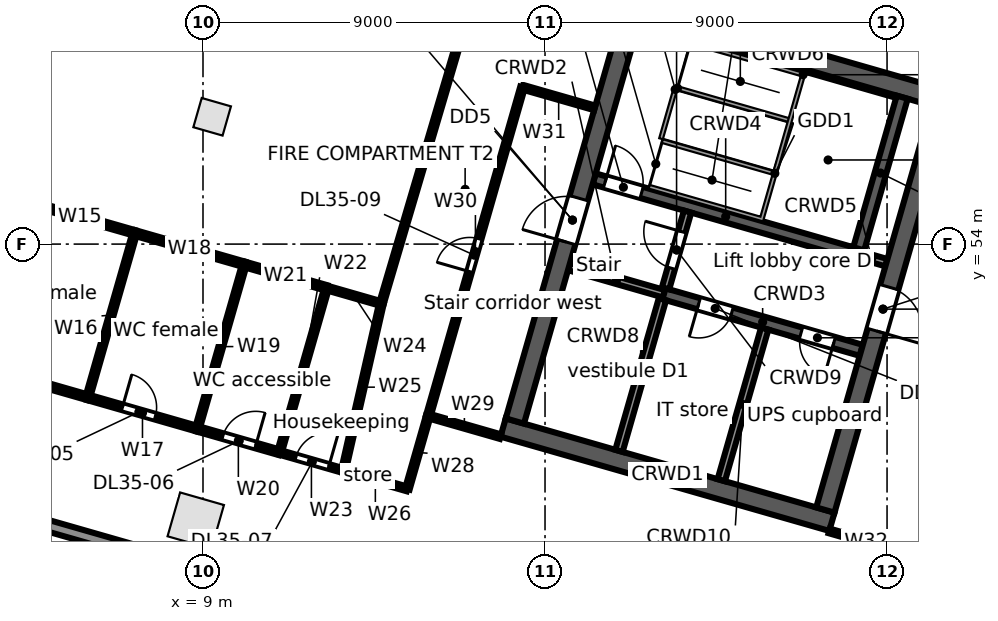
"""IFC4 building model, lengths in metres.
Left out: names, types, materials, properties, quantities, classifications, styles, units other than length and angle.
Written with IfcOpenShell. Run it as: python <this file> out.ifc"""

import sys

from ifc_helpers import new_model, si_unit, direction, frame, frame_2d, origin, origin_2d, place, context, subcontext, project, spatial, rectangle, extrude, element, fill, save


model = new_model("IFC4")
c1 = context("Model", 3, precision=1e-05, world=origin(), true_north=direction((0.0, 1.0)))
c2 = subcontext(c1, "Body", "Model", "MODEL_VIEW")
j1 = project(units=[si_unit("LENGTHUNIT", "METRE"), si_unit("PLANEANGLEUNIT", "RADIAN")], contexts=[c1])
p1 = place(None, origin())
s1 = spatial("IfcSite", under=j1, at=p1, CompositionType="ELEMENT")
p2 = place(p1, origin())
s2 = spatial("IfcBuilding", under=s1, at=p2, CompositionType="ELEMENT")
p3 = place(p2, frame((0.0, 0.0, 174.9)))
s3 = spatial("IfcBuildingStorey", under=s2, at=p3, CompositionType="ELEMENT", Elevation=174.9)
p4 = place(p3, frame((8.81, 46.722, 0.0), z_axis=(0.0, 0.0, 1.0), x_axis=(0.961261695938, -0.275637355817, 0.0)))
e1 = element("IfcColumn", 1, at=p4, inside=s3, PredefinedType="COLUMN", context=c2, shape_type="SweptSolid", body=[
    extrude(rectangle(XDim=1.2, YDim=1.2, at=origin_2d()), origin(), (0.0, 0.0, 1.0), 4.0),
])
p5 = place(p3, frame((9.241, 57.35, 0.0), z_axis=(0.0, 0.0, 1.0), x_axis=(0.961261695938, -0.275637355817, 0.0)))
e2 = element("IfcColumn", 2, at=p5, inside=s3, PredefinedType="COLUMN", context=c2, shape_type="SweptSolid", body=[
    extrude(rectangle(XDim=0.8, YDim=0.8, at=origin_2d()), origin(), (0.0, 0.0, 1.0), 4.0),
])
p6 = place(p3, frame((24.042, 41.106, 0.0), z_axis=(0.0, 0.0, 1.0), x_axis=(-0.961261693976, 0.275637362661, 0.0)))
e3 = element("IfcWall", 3, at=p6, inside=s3, PredefinedType="STANDARD", context=c2, shape_type="SweptSolid", body=[
    extrude(rectangle(XDim=24.948, YDim=0.3, at=frame_2d((12.474, 0.0))), origin(), (0.0, 0.0, 1.0), 3.68),
])
p7 = place(p6, frame((21.441, 0.0, 0.6)))
e4 = element("IfcOpeningElement", 4, at=p7, cuts=e3, PredefinedType="OPENING", context=c2, shape_type="SweptSolid", body=[
    extrude(rectangle(XDim=0.9, YDim=2.4, at=frame_2d((0.45, 1.2))), frame((0.0, 0.16, 0.0), z_axis=(0.0, -1.0, 0.0), x_axis=(1.0, 0.0, 0.0)), (0.0, 0.0, 1.0), 0.32),
])
p8 = place(p6, frame((13.121, 0.0, 0.6)))
e5 = element("IfcOpeningElement", 5, at=p8, cuts=e3, PredefinedType="OPENING", context=c2, shape_type="SweptSolid", body=[
    extrude(rectangle(XDim=0.9, YDim=2.4, at=frame_2d((0.45, 1.2))), frame((0.0, 0.16, 0.0), z_axis=(0.0, -1.0, 0.0), x_axis=(1.0, 0.0, 0.0)), (0.0, 0.0, 1.0), 0.32),
])
p9 = place(p6, frame((10.591, 0.0, 0.0)))
e6 = element("IfcOpeningElement", 6, at=p9, cuts=e3, PredefinedType="OPENING", context=c2, shape_type="SweptSolid", body=[
    extrude(rectangle(XDim=1.8, YDim=2.4, at=frame_2d((0.9, 1.2))), frame((0.0, 0.16, 0.0), z_axis=(0.0, -1.0, 0.0), x_axis=(1.0, 0.0, 0.0)), (0.0, 0.0, 1.0), 0.32),
])
p10 = place(p6, frame((4.8, 0.0, 0.6)))
e7 = element("IfcOpeningElement", 7, at=p10, cuts=e3, PredefinedType="OPENING", context=c2, shape_type="SweptSolid", body=[
    extrude(rectangle(XDim=0.9, YDim=2.4, at=frame_2d((0.45, 1.2))), frame((0.0, 0.16, 0.0), z_axis=(0.0, -1.0, 0.0), x_axis=(1.0, 0.0, 0.0)), (0.0, 0.0, 1.0), 0.32),
])
p11 = place(p6, frame((2.27, 0.0, 0.0)))
e8 = element("IfcOpeningElement", 8, at=p11, cuts=e3, PredefinedType="OPENING", context=c2, shape_type="SweptSolid", body=[
    extrude(rectangle(XDim=1.8, YDim=2.4, at=frame_2d((0.9, 1.2))), frame((0.0, 0.16, 0.0), z_axis=(0.0, -1.0, 0.0), x_axis=(1.0, 0.0, 0.0)), (0.0, 0.0, 1.0), 0.32),
])
p12 = place(p3, frame((37.399, 59.851, 0.0), z_axis=(0.0, 0.0, 1.0), x_axis=(-0.529919986982, -0.848047644532, 0.0)))
e9 = element("IfcWall", 9, at=p12, inside=s3, PredefinedType="STANDARD", context=c2, shape_type="SweptSolid", body=[
    extrude(rectangle(XDim=21.125, YDim=0.3, at=frame_2d((10.562, 0.0))), origin(), (0.0, 0.0, 1.0), 3.68),
])
p13 = place(p12, frame((16.687, 0.0, 0.6)))
e10 = element("IfcOpeningElement", 10, at=p13, cuts=e9, PredefinedType="OPENING", context=c2, shape_type="SweptSolid", body=[
    extrude(rectangle(XDim=0.9, YDim=2.4, at=frame_2d((0.45, 1.2))), frame((0.0, 0.16, 0.0), z_axis=(0.0, -1.0, 0.0), x_axis=(1.0, 0.0, 0.0)), (0.0, 0.0, 1.0), 0.32),
])
p14 = place(p12, frame((6.187, 0.0, 0.6)))
e11 = element("IfcOpeningElement", 11, at=p14, cuts=e9, PredefinedType="OPENING", context=c2, shape_type="SweptSolid", body=[
    extrude(rectangle(XDim=0.9, YDim=2.4, at=frame_2d((0.45, 1.2))), frame((0.0, 0.16, 0.0), z_axis=(0.0, -1.0, 0.0), x_axis=(1.0, 0.0, 0.0)), (0.0, 0.0, 1.0), 0.32),
])
p15 = place(p3, frame((16.897, 49.173, 0.0), z_axis=(0.0, 0.0, 1.0), x_axis=(0.96126248289, -0.275634611374, 0.0)))
e12 = element("IfcWall", 12, at=p15, inside=s3, PredefinedType="SOLIDWALL", context=c2, shape_type="SweptSolid", body=[
    extrude(rectangle(XDim=9.0, YDim=0.5, at=frame_2d((4.5, 0.0))), origin(), (0.0, 0.0, 1.0), 3.68),
])
p16 = place(p3, frame((18.632, 53.409, 0.0), z_axis=(0.0, 0.0, 1.0), x_axis=(0.961247078216, -0.275688328772, 0.0)))
e13 = element("IfcWall", 13, at=p16, inside=s3, PredefinedType="SOLIDWALL", context=c2, shape_type="SweptSolid", body=[
    extrude(rectangle(XDim=2.6, YDim=0.2, at=frame_2d((1.3, 0.0))), origin(), (0.0, 0.0, 1.0), 3.68),
])
p17 = place(p3, frame((21.131, 52.692, 0.0), z_axis=(0.0, 0.0, 1.0), x_axis=(0.961271043721, -0.27560475414, 0.0)))
e14 = element("IfcWall", 14, at=p17, inside=s3, PredefinedType="SOLIDWALL", context=c2, shape_type="SweptSolid", body=[
    extrude(rectangle(XDim=5.4, YDim=0.3, at=frame_2d((2.7, 0.0))), origin(), (0.0, 0.0, 1.0), 3.68),
])
p18 = place(p17, frame((0.95, 0.0, 0.0)))
e15 = element("IfcOpeningElement", 15, at=p18, cuts=e14, PredefinedType="OPENING", context=c2, shape_type="SweptSolid", body=[
    extrude(rectangle(XDim=0.9, YDim=2.1, at=frame_2d((0.45, 1.05))), frame((0.0, 0.16, 0.0), z_axis=(0.0, -1.0, 0.0), x_axis=(1.0, 0.0, 0.0)), (0.0, 0.0, 1.0), 0.32),
])
p19 = place(p17, frame((3.75, 0.0, 0.0)))
e16 = element("IfcOpeningElement", 16, at=p19, cuts=e14, PredefinedType="OPENING", context=c2, shape_type="SweptSolid", body=[
    extrude(rectangle(XDim=0.9, YDim=2.1, at=frame_2d((0.45, 1.05))), frame((0.0, 0.16, 0.0), z_axis=(0.0, -1.0, 0.0), x_axis=(1.0, 0.0, 0.0)), (0.0, 0.0, 1.0), 0.32),
])
p20 = place(p3, frame((19.293, 55.716, 0.0), z_axis=(0.0, 0.0, 1.0), x_axis=(0.96125862491, -0.275648065539, 0.0)))
e17 = element("IfcWall", 17, at=p20, inside=s3, PredefinedType="SOLIDWALL", context=c2, shape_type="SweptSolid", body=[
    extrude(rectangle(XDim=7.2, YDim=0.3, at=frame_2d((3.6, 0.0))), origin(), (0.0, 0.0, 1.0), 3.68),
])
p21 = place(p20, frame((0.3, 0.0, 0.0)))
e18 = element("IfcOpeningElement", 18, at=p21, cuts=e17, PredefinedType="OPENING", context=c2, shape_type="SweptSolid", body=[
    extrude(rectangle(XDim=1.0, YDim=2.1, at=frame_2d((0.5, 1.05))), frame((0.0, 0.16, 0.0), z_axis=(0.0, -1.0, 0.0), x_axis=(1.0, 0.0, 0.0)), (0.0, 0.0, 1.0), 0.32),
])
p22 = place(p3, frame((26.214, 53.732, 0.0), z_axis=(0.0, 0.0, 1.0), x_axis=(0.961200870072, -0.275849392554, 0.0)))
e19 = element("IfcWall", 19, at=p22, inside=s3, PredefinedType="SOLIDWALL", context=c2, shape_type="SweptSolid", body=[
    extrude(rectangle(XDim=0.8, YDim=0.2, at=frame_2d((0.4, 0.0))), origin(), (0.0, 0.0, 1.0), 3.68),
])
p23 = place(p3, frame((20.067, 60.228, 0.0), z_axis=(0.0, 0.0, 1.0), x_axis=(0.96126248289, -0.275634611374, 0.0)))
e20 = element("IfcWall", 20, at=p23, inside=s3, PredefinedType="SOLIDWALL", context=c2, shape_type="SweptSolid", body=[
    extrude(rectangle(XDim=9.0, YDim=0.5, at=frame_2d((4.5, 0.0))), origin(), (0.0, 0.0, 1.0), 3.68),
])
p24 = place(p3, frame((17.206, 49.344, 0.0), z_axis=(0.0, 0.0, 1.0), x_axis=(0.275632651182, 0.961263044958, 0.0)))
e21 = element("IfcWall", 21, at=p24, inside=s3, PredefinedType="SOLIDWALL", context=c2, shape_type="SweptSolid", body=[
    extrude(rectangle(XDim=11.0, YDim=0.5, at=frame_2d((5.5, 0.0))), origin(), (0.0, 0.0, 1.0), 3.68),
])
p25 = place(p24, frame((4.9, 0.0, 0.0)))
e22 = element("IfcOpeningElement", 22, at=p25, cuts=e21, PredefinedType="OPENING", context=c2, shape_type="SweptSolid", body=[
    extrude(rectangle(XDim=1.2, YDim=2.1, at=frame_2d((0.6, 1.05))), frame((0.0, 0.26, 0.0), z_axis=(0.0, -1.0, 0.0), x_axis=(1.0, 0.0, 0.0)), (0.0, 0.0, 1.0), 0.52),
])
p26 = place(p3, frame((19.946, 48.559, 0.0), z_axis=(0.0, 0.0, 1.0), x_axis=(0.275668905258, 0.961252648721, 0.0)))
e23 = element("IfcWall", 23, at=p26, inside=s3, PredefinedType="SOLIDWALL", context=c2, shape_type="SweptSolid", body=[
    extrude(rectangle(XDim=4.15, YDim=0.2, at=frame_2d((2.075, 0.0))), origin(), (0.0, 0.0, 1.0), 3.68),
])
p27 = place(p3, frame((21.172, 52.837, 0.0), z_axis=(0.0, 0.0, 1.0), x_axis=(0.275657676022, 0.961255868981, 0.0)))
e24 = element("IfcWall", 24, at=p27, inside=s3, PredefinedType="PARTITIONING", context=c2, shape_type="SweptSolid", body=[
    extrude(rectangle(XDim=2.1, YDim=0.2, at=frame_2d((1.05, 0.0))), origin(), (0.0, 0.0, 1.0), 3.68),
])
p28 = place(p27, frame((0.55, 0.0, 0.0)))
e25 = element("IfcOpeningElement", 25, at=p28, cuts=e24, PredefinedType="OPENING", context=c2, shape_type="SweptSolid", body=[
    extrude(rectangle(XDim=1.0, YDim=2.1, at=frame_2d((0.5, 1.05))), frame((0.0, 0.11, 0.0), z_axis=(0.0, -1.0, 0.0), x_axis=(1.0, 0.0, 0.0)), (0.0, 0.0, 1.0), 0.22),
])
p29 = place(p3, frame((22.637, 47.787, 0.0), z_axis=(0.0, 0.0, 1.0), x_axis=(0.275614546295, 0.961268236171, 0.0)))
e26 = element("IfcWall", 26, at=p29, inside=s3, PredefinedType="PARTITIONING", context=c2, shape_type="SweptSolid", body=[
    extrude(rectangle(XDim=4.15, YDim=0.2, at=frame_2d((2.075, 0.0))), origin(), (0.0, 0.0, 1.0), 3.68),
])
p30 = place(p3, frame((26.256, 53.876, 0.0), z_axis=(0.0, 0.0, 1.0), x_axis=(0.275614546295, 0.961268236171, 0.0)))
e27 = element("IfcWall", 27, at=p30, inside=s3, PredefinedType="SOLIDWALL", context=c2, shape_type="SweptSolid", body=[
    extrude(rectangle(XDim=4.15, YDim=0.3, at=frame_2d((2.075, 0.0))), origin(), (0.0, 0.0, 1.0), 3.68),
])
p31 = place(p3, frame((25.377, 47.002, 0.0), z_axis=(0.0, 0.0, 1.0), x_axis=(0.275632651182, 0.961263044958, 0.0)))
e28 = element("IfcWall", 28, at=p31, inside=s3, PredefinedType="SOLIDWALL", context=c2, shape_type="SweptSolid", body=[
    extrude(rectangle(XDim=11.0, YDim=0.5, at=frame_2d((5.5, 0.0))), origin(), (0.0, 0.0, 1.0), 3.68),
])
p32 = place(p31, frame((4.9, 0.0, 0.0)))
e29 = element("IfcOpeningElement", 29, at=p32, cuts=e28, PredefinedType="OPENING", context=c2, shape_type="SweptSolid", body=[
    extrude(rectangle(XDim=1.2, YDim=2.1, at=frame_2d((0.6, 1.05))), frame((0.0, 0.26, 0.0), z_axis=(0.0, -1.0, 0.0), x_axis=(1.0, 0.0, 0.0)), (0.0, 0.0, 1.0), 0.52),
])
p33 = place(p3, frame((2.601, 50.932, 0.0), z_axis=(0.0, 0.0, 1.0), x_axis=(0.961265606965, -0.27562371608, 0.0)))
e30 = element("IfcWall", 30, at=p33, inside=s3, PredefinedType="PARTITIONING", context=c2, shape_type="SweptSolid", body=[
    extrude(rectangle(XDim=3.5, YDim=0.15, at=frame_2d((1.75, 0.0))), origin(), (0.0, 0.0, 1.0), 3.68),
])
p34 = place(p33, frame((1.2, 0.0, 0.0)))
e31 = element("IfcOpeningElement", 31, at=p34, cuts=e30, PredefinedType="OPENING", context=c2, shape_type="SweptSolid", body=[
    extrude(rectangle(XDim=0.9, YDim=2.1, at=frame_2d((0.45, 1.05))), frame((0.0, 0.085, 0.0), z_axis=(0.0, -1.0, 0.0), x_axis=(1.0, 0.0, 0.0)), (0.0, 0.0, 1.0), 0.17),
])
p35 = place(p3, frame((4.322, 55.12, 0.0), z_axis=(0.0, 0.0, 1.0), x_axis=(0.961247103494, -0.275688240636, 0.0)))
e32 = element("IfcWall", 32, at=p35, inside=s3, PredefinedType="PARTITIONING", context=c2, shape_type="SweptSolid", body=[
    extrude(rectangle(XDim=3.0, YDim=0.15, at=frame_2d((1.5, 0.0))), origin(), (0.0, 0.0, 1.0), 3.68),
])
p36 = place(p3, frame((5.966, 49.967, 0.0), z_axis=(0.0, 0.0, 1.0), x_axis=(0.275545040649, 0.96128816209, 0.0)))
e33 = element("IfcWall", 33, at=p36, inside=s3, PredefinedType="PARTITIONING", context=c2, shape_type="SweptSolid", body=[
    extrude(rectangle(XDim=4.5, YDim=0.125, at=frame_2d((2.25, 0.0))), origin(), (0.0, 0.0, 1.0), 3.68),
])
p37 = place(p3, frame((5.966, 49.967, 0.0), z_axis=(0.0, 0.0, 1.0), x_axis=(0.961222353496, -0.275774522283, 0.0)))
e34 = element("IfcWall", 34, at=p37, inside=s3, PredefinedType="PARTITIONING", context=c2, shape_type="SweptSolid", body=[
    extrude(rectangle(XDim=2.999, YDim=0.15, at=frame_2d((1.5, 0.0))), origin(), (0.0, 0.0, 1.0), 2.852),
])
p38 = place(p37, frame((0.95, 0.0, 0.0)))
e35 = element("IfcOpeningElement", 35, at=p38, cuts=e34, PredefinedType="OPENING", context=c2, shape_type="SweptSolid", body=[
    extrude(rectangle(XDim=0.9, YDim=2.1, at=frame_2d((0.45, 1.05))), frame((0.0, 0.085, 0.0), z_axis=(0.0, -1.0, 0.0), x_axis=(1.0, 0.0, 0.0)), (0.0, 0.0, 1.0), 0.17),
])
p39 = place(p3, frame((7.206, 54.293, 0.0), z_axis=(0.0, 0.0, 1.0), x_axis=(0.961268664977, -0.27561305073, 0.0)))
e36 = element("IfcWall", 36, at=p39, inside=s3, PredefinedType="PARTITIONING", context=c2, shape_type="SweptSolid", body=[
    extrude(rectangle(XDim=3.0, YDim=0.15, at=frame_2d((1.5, 0.0))), origin(), (0.0, 0.0, 1.0), 2.852),
])
p40 = place(p3, frame((8.849, 49.14, 0.0), z_axis=(0.0, 0.0, 1.0), x_axis=(0.275731175537, 0.961234788612, 0.0)))
e37 = element("IfcWall", 37, at=p40, inside=s3, PredefinedType="PARTITIONING", context=c2, shape_type="SweptSolid", body=[
    extrude(rectangle(XDim=4.501, YDim=0.125, at=frame_2d((2.25, 0.0))), origin(), (0.0, 0.0, 1.0), 2.852),
])
p41 = place(p3, frame((8.849, 49.14, 0.0), z_axis=(0.0, 0.0, 1.0), x_axis=(0.961298413165, -0.275509275429, 0.0)))
e38 = element("IfcWall", 38, at=p41, inside=s3, PredefinedType="PARTITIONING", context=c2, shape_type="SweptSolid", body=[
    extrude(rectangle(XDim=2.25, YDim=0.15, at=frame_2d((1.125, 0.0))), origin(), (0.0, 0.0, 1.0), 2.748),
])
p42 = place(p41, frame((0.7, 0.0, 0.0)))
e39 = element("IfcOpeningElement", 39, at=p42, cuts=e38, PredefinedType="OPENING", context=c2, shape_type="SweptSolid", body=[
    extrude(rectangle(XDim=0.9, YDim=2.1, at=frame_2d((0.45, 1.05))), frame((0.0, 0.085, 0.0), z_axis=(0.0, -1.0, 0.0), x_axis=(1.0, 0.0, 0.0)), (0.0, 0.0, 1.0), 0.17),
])
p43 = place(p3, frame((10.09, 53.466, 0.0), z_axis=(0.0, 0.0, 1.0), x_axis=(0.961269670038, -0.275609545309, 0.0)))
e40 = element("IfcWall", 40, at=p43, inside=s3, PredefinedType="PARTITIONING", context=c2, shape_type="SweptSolid", body=[
    extrude(rectangle(XDim=2.25, YDim=0.15, at=frame_2d((1.125, 0.0))), origin(), (0.0, 0.0, 1.0), 2.748),
])
p44 = place(p3, frame((11.012, 48.52, 0.0), z_axis=(0.0, 0.0, 1.0), x_axis=(0.275745553681, 0.96123066411, 0.0)))
e41 = element("IfcWall", 41, at=p44, inside=s3, PredefinedType="PARTITIONING", context=c2, shape_type="SweptSolid", body=[
    extrude(rectangle(XDim=4.5, YDim=0.125, at=frame_2d((2.25, 0.0))), origin(), (0.0, 0.0, 1.0), 3.68),
])
p45 = place(p3, frame((11.012, 48.52, 0.0), z_axis=(0.0, 0.0, 1.0), x_axis=(0.961323619822, -0.275421309946, 0.0)))
e42 = element("IfcWall", 42, at=p45, inside=s3, PredefinedType="PARTITIONING", context=c2, shape_type="SweptSolid", body=[
    extrude(rectangle(XDim=1.75, YDim=0.125, at=frame_2d((0.875, 0.0))), origin(), (0.0, 0.0, 1.0), 3.68),
])
p46 = place(p45, frame((0.45, 0.0, 0.0)))
e43 = element("IfcOpeningElement", 43, at=p46, cuts=e42, PredefinedType="OPENING", context=c2, shape_type="SweptSolid", body=[
    extrude(rectangle(XDim=0.9, YDim=2.1, at=frame_2d((0.45, 1.05))), frame((0.0, 0.073, 0.0), z_axis=(0.0, -1.0, 0.0), x_axis=(1.0, 0.0, 0.0)), (0.0, 0.0, 1.0), 0.145),
])
p47 = place(p3, frame((12.253, 52.846, 0.0), z_axis=(0.0, 0.0, 1.0), x_axis=(0.961117390016, -0.276140114089, 0.0)))
e44 = element("IfcWall", 44, at=p47, inside=s3, PredefinedType="PARTITIONING", context=c2, shape_type="SweptSolid", body=[
    extrude(rectangle(XDim=1.5, YDim=0.125, at=frame_2d((0.75, 0.0))), origin(), (0.0, 0.0, 1.0), 3.68),
])
p48 = place(p3, frame((12.694, 48.038, 0.0), z_axis=(0.0, 0.0, 1.0), x_axis=(0.221918494106, 0.975065219344, 0.0)))
e45 = element("IfcWall", 45, at=p48, inside=s3, PredefinedType="PARTITIONING", context=c2, shape_type="SweptSolid", body=[
    extrude(rectangle(XDim=4.506, YDim=0.125, at=frame_2d((2.253, 0.0))), origin(), (0.0, 0.0, 1.0), 3.68),
])
p49 = place(p3, frame((12.694, 48.038, 0.0), z_axis=(0.0, 0.0, 1.0), x_axis=(0.961170605556, -0.275954827854, 0.0)))
e46 = element("IfcWall", 46, at=p49, inside=s3, PredefinedType="PARTITIONING", context=c2, shape_type="SweptSolid", body=[
    extrude(rectangle(XDim=1.751, YDim=0.125, at=frame_2d((0.875, 0.0))), origin(), (0.0, 0.0, 1.0), 3.68),
])
p50 = place(p3, frame((13.694, 52.432, 0.0), z_axis=(0.0, 0.0, 1.0), x_axis=(0.28327517645, 0.959038672008, 0.0)))
e47 = element("IfcWall", 47, at=p50, inside=s3, PredefinedType="PARTITIONING", context=c2, shape_type="SweptSolid", body=[
    extrude(rectangle(XDim=14.886, YDim=0.125, at=frame_2d((7.443, 0.0))), origin(), (0.0, 0.0, 1.0), 2.748),
])
p51 = place(p3, frame((14.377, 47.555, 0.0), z_axis=(0.0, 0.0, 1.0), x_axis=(0.275446387355, 0.961316434736, 0.0)))
e48 = element("IfcWall", 48, at=p51, inside=s3, PredefinedType="PARTITIONING", context=c2, shape_type="SweptSolid", body=[
    extrude(rectangle(XDim=2.0, YDim=0.125, at=frame_2d((1.0, 0.0))), origin(), (0.0, 0.0, 1.0), 3.68),
])
p52 = place(p3, frame((14.928, 49.478, 0.0), z_axis=(0.0, 0.0, 1.0), x_axis=(0.961243778232, -0.27569983462, 0.0)))
e49 = element("IfcWall", 49, at=p52, inside=s3, PredefinedType="PARTITIONING", context=c2, shape_type="SweptSolid", body=[
    extrude(rectangle(XDim=1.977, YDim=0.125, at=frame_2d((0.988, 0.0))), origin(), (0.0, 0.0, 1.0), 3.68),
])
p53 = place(p3, frame((14.928, 49.478, 0.0), z_axis=(0.0, 0.0, 1.0), x_axis=(0.275674053528, 0.961251172281, 0.0)))
e50 = element("IfcWall", 50, at=p53, inside=s3, PredefinedType="PARTITIONING", context=c2, shape_type="SweptSolid", body=[
    extrude(rectangle(XDim=9.0, YDim=0.125, at=frame_2d((4.5, 0.0))), origin(), (0.0, 0.0, 1.0), 2.748),
])
p54 = place(p53, frame((3.95, 0.0, 0.0)))
e51 = element("IfcOpeningElement", 51, at=p54, cuts=e50, PredefinedType="OPENING", context=c2, shape_type="SweptSolid", body=[
    extrude(rectangle(XDim=0.9, YDim=2.1, at=frame_2d((0.45, 1.05))), frame((0.0, 0.073, 0.0), z_axis=(0.0, -1.0, 0.0), x_axis=(1.0, 0.0, 0.0)), (0.0, 0.0, 1.0), 0.145),
])
p55 = place(p3, frame((17.409, 58.129, 0.0), z_axis=(0.0, 0.0, 1.0), x_axis=(0.961253165474, -0.275667103345, 0.0)))
e52 = element("IfcWall", 52, at=p55, inside=s3, PredefinedType="PARTITIONING", context=c2, shape_type="SweptSolid", body=[
    extrude(rectangle(XDim=1.977, YDim=0.125, at=frame_2d((0.988, 0.0))), origin(), (0.0, 0.0, 1.0), 3.68),
])
p56 = place(p3, frame((25.479, 46.452, 0.0), z_axis=(0.0, 0.0, 1.0), x_axis=(0.961245725795, -0.275693044238, 0.0)))
e53 = element("IfcWall", 53, at=p56, inside=s3, PredefinedType="PARTITIONING", context=c2, shape_type="SweptSolid", body=[
    extrude(rectangle(XDim=2.023, YDim=0.125, at=frame_2d((1.012, 0.0))), origin(), (0.0, 0.0, 1.0), 2.952),
])
p57 = place(p21, origin())
e54 = element("IfcDoor", 54, at=p57, inside=s3, OperationType="SINGLE_SWING_LEFT", PredefinedType="DOOR", context=c2, shape_type="SweptSolid", body=[
    extrude(rectangle(XDim=1.0, YDim=2.1, at=frame_2d((0.5, 1.05))), frame((0.0, 0.025, 0.0), z_axis=(0.0, -1.0, 0.0), x_axis=(1.0, 0.0, 0.0)), (0.0, 0.0, 1.0), 0.05),
])
fill(e18, e54)
p58 = place(p28, origin())
e55 = element("IfcDoor", 55, at=p58, inside=s3, OperationType="SINGLE_SWING_RIGHT", PredefinedType="DOOR", context=c2, shape_type="SweptSolid", body=[
    extrude(rectangle(XDim=1.0, YDim=2.1, at=frame_2d((0.5, 1.05))), frame((0.0, 0.025, 0.0), z_axis=(0.0, -1.0, 0.0), x_axis=(1.0, 0.0, 0.0)), (0.0, 0.0, 1.0), 0.05),
])
fill(e25, e55)
p59 = place(p25, origin())
e56 = element("IfcDoor", 56, at=p59, inside=s3, OperationType="SINGLE_SWING_LEFT", PredefinedType="DOOR", context=c2, shape_type="SweptSolid", body=[
    extrude(rectangle(XDim=1.2, YDim=2.1, at=frame_2d((0.6, 1.05))), frame((0.0, 0.025, 0.0), z_axis=(0.0, -1.0, 0.0), x_axis=(1.0, 0.0, 0.0)), (0.0, 0.0, 1.0), 0.05),
])
fill(e22, e56)
p60 = place(p32, frame((1.2, 0.0, 0.0), z_axis=(0.0, 0.0, 1.0), x_axis=(-1.0, 0.0, 0.0)))
e57 = element("IfcDoor", 57, at=p60, inside=s3, OperationType="SINGLE_SWING_RIGHT", PredefinedType="DOOR", context=c2, shape_type="SweptSolid", body=[
    extrude(rectangle(XDim=1.2, YDim=2.1, at=frame_2d((0.6, 1.05))), frame((0.0, 0.025, 0.0), z_axis=(0.0, -1.0, 0.0), x_axis=(1.0, 0.0, 0.0)), (0.0, 0.0, 1.0), 0.05),
])
fill(e29, e57)
p61 = place(p18, frame((0.9, 0.0, 0.0), z_axis=(0.0, 0.0, 1.0), x_axis=(-1.0, 0.0, 0.0)))
e58 = element("IfcDoor", 58, at=p61, inside=s3, OperationType="SINGLE_SWING_RIGHT", PredefinedType="DOOR", context=c2, shape_type="SweptSolid", body=[
    extrude(rectangle(XDim=0.9, YDim=2.1, at=frame_2d((0.45, 1.05))), frame((0.0, 0.025, 0.0), z_axis=(0.0, -1.0, 0.0), x_axis=(1.0, 0.0, 0.0)), (0.0, 0.0, 1.0), 0.05),
])
fill(e15, e58)
p62 = place(p19, frame((0.9, 0.0, 0.0), z_axis=(0.0, 0.0, 1.0), x_axis=(-1.0, 0.0, 0.0)))
e59 = element("IfcDoor", 59, at=p62, inside=s3, OperationType="SINGLE_SWING_LEFT", PredefinedType="DOOR", context=c2, shape_type="SweptSolid", body=[
    extrude(rectangle(XDim=0.9, YDim=2.1, at=frame_2d((0.45, 1.05))), frame((0.0, 0.025, 0.0), z_axis=(0.0, -1.0, 0.0), x_axis=(1.0, 0.0, 0.0)), (0.0, 0.0, 1.0), 0.05),
])
fill(e16, e59)
p63 = place(p38, origin())
e60 = element("IfcDoor", 60, at=p63, inside=s3, OperationType="SINGLE_SWING_LEFT", PredefinedType="DOOR", context=c2, shape_type="SweptSolid", body=[
    extrude(rectangle(XDim=0.9, YDim=2.1, at=frame_2d((0.45, 1.05))), frame((0.0, 0.025, 0.0), z_axis=(0.0, -1.0, 0.0), x_axis=(1.0, 0.0, 0.0)), (0.0, 0.0, 1.0), 0.05),
])
fill(e35, e60)
p64 = place(p42, origin())
e61 = element("IfcDoor", 61, at=p64, inside=s3, OperationType="SINGLE_SWING_RIGHT", PredefinedType="DOOR", context=c2, shape_type="SweptSolid", body=[
    extrude(rectangle(XDim=0.9, YDim=2.1, at=frame_2d((0.45, 1.05))), frame((0.0, 0.025, 0.0), z_axis=(0.0, -1.0, 0.0), x_axis=(1.0, 0.0, 0.0)), (0.0, 0.0, 1.0), 0.05),
])
fill(e39, e61)
p65 = place(p46, origin())
e62 = element("IfcDoor", 62, at=p65, inside=s3, OperationType="SINGLE_SWING_RIGHT", PredefinedType="DOOR", context=c2, shape_type="SweptSolid", body=[
    extrude(rectangle(XDim=0.9, YDim=2.1, at=frame_2d((0.45, 1.05))), frame((0.0, 0.025, 0.0), z_axis=(0.0, -1.0, 0.0), x_axis=(1.0, 0.0, 0.0)), (0.0, 0.0, 1.0), 0.05),
])
fill(e43, e62)
p66 = place(p54, origin())
e63 = element("IfcDoor", 63, at=p66, inside=s3, OperationType="SINGLE_SWING_LEFT", PredefinedType="DOOR", context=c2, shape_type="SweptSolid", body=[
    extrude(rectangle(XDim=0.9, YDim=2.1, at=frame_2d((0.45, 1.05))), frame((0.0, 0.025, 0.0), z_axis=(0.0, -1.0, 0.0), x_axis=(1.0, 0.0, 0.0)), (0.0, 0.0, 1.0), 0.05),
])
fill(e51, e63)
save(model, sys.argv[1])
